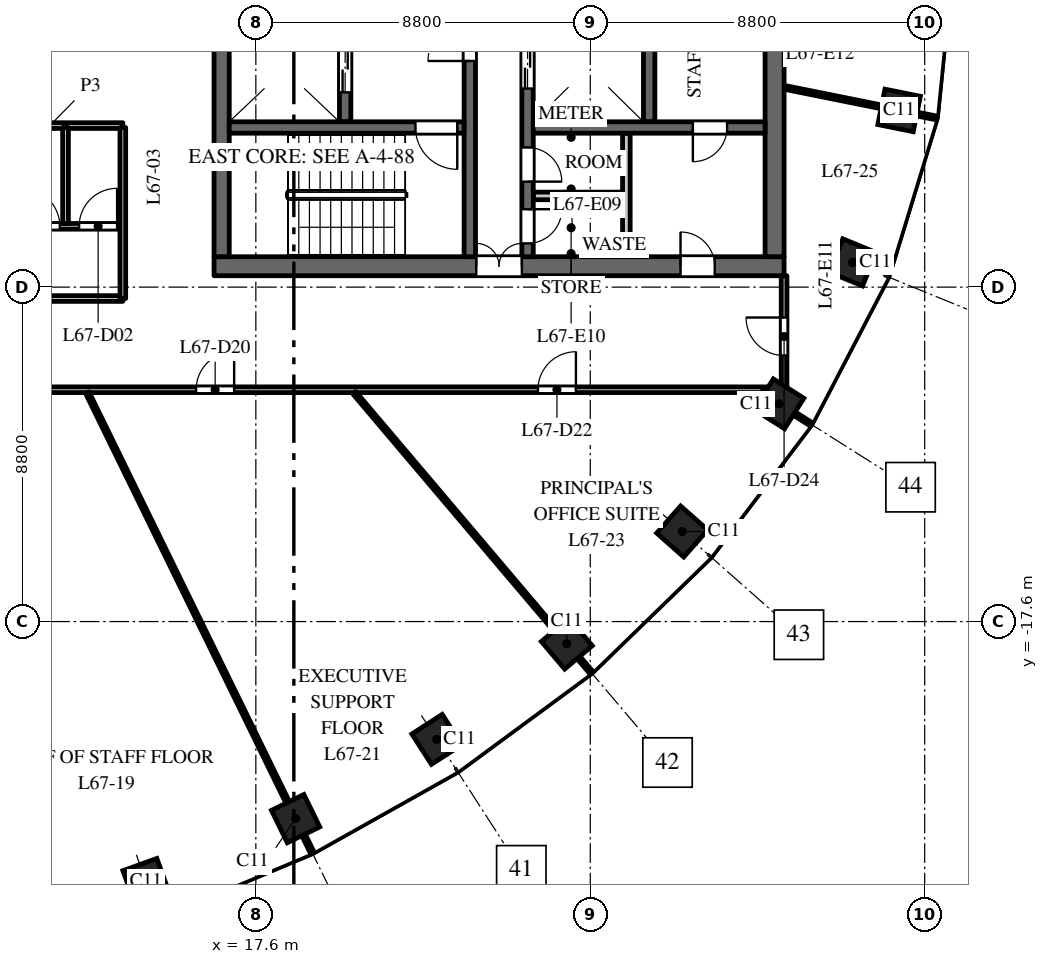
"""IFC4 building model, lengths in metres.
Left out: names, types, materials, properties, quantities, classifications, styles, units other than length and angle.
Written with IfcOpenShell. Run it as: python <this file> out.ifc"""

import sys

from ifc_helpers import new_model, si_unit, direction, frame, frame_2d, origin, origin_2d, place, context, subcontext, project, spatial, rectangle, extrude, element, fill, save


model = new_model("IFC4")
c1 = context("Model", 3, precision=1e-05, world=origin(), true_north=direction((0.0, 1.0)))
c2 = subcontext(c1, "Body", "Model", "MODEL_VIEW")
j1 = project(units=[si_unit("LENGTHUNIT", "METRE"), si_unit("PLANEANGLEUNIT", "RADIAN")], contexts=[c1])
p1 = place(None, origin())
s1 = spatial("IfcSite", under=j1, at=p1, CompositionType="ELEMENT")
p2 = place(p1, origin())
s2 = spatial("IfcBuilding", under=s1, at=p2, CompositionType="ELEMENT")
p3 = place(p2, frame((0.0, 0.0, 311.0)))
s3 = spatial("IfcBuildingStorey", under=s2, at=p3, CompositionType="ELEMENT", Elevation=311.0)
for number, where, z_axis, x_axis in (
    (1, (14.709, -24.441, 0.0), (0.0, 0.0, 1.0), (0.941, 0.338, 0.0)),
    (2, (18.646, -22.785, 0.0), (0.0, 0.0, 1.0), (0.898, 0.439, 0.0)),
    (3, (22.362, -20.7, 0.0), (0.0, 0.0, 1.0), (0.84, 0.542, 0.0)),
    (4, (25.783, -18.18, 0.0), (0.0, 0.0, 1.0), (0.763, 0.646, 0.0)),
    (5, (28.819, -15.23, 0.0), (0.0, 0.0, 1.0), (0.663, 0.749, 0.0)),
    (6, (31.365, -11.871, 0.0), (0.0, 0.0, 1.0), (0.535, 0.845, 0.0)),
    (7, (33.305, -8.149, 0.0), (0.0, 0.0, 1.0), (0.379, 0.925, 0.0)),
    (8, (34.527, -4.151, 0.0), (0.0, 0.0, 1.0), (0.197, 0.98, 0.0)),
):
    element("IfcColumn", number, at=place(p3, frame(where, z_axis=z_axis, x_axis=x_axis)), inside=s3, PredefinedType="COLUMN", context=c2, shape_type="SweptSolid", body=[
        extrude(rectangle(XDim=0.95, YDim=0.95, at=origin_2d()), origin(), (0.0, 0.0, 1.0), 4.0),
    ])
p4 = place(p3, frame((16.5, -8.25, 0.0), z_axis=(0.0, 0.0, 1.0), x_axis=(1.0, 0.0, 0.0)))
e9 = element("IfcWall", 9, at=p4, inside=s3, PredefinedType="SHEAR", context=c2, shape_type="SweptSolid", body=[
    extrude(rectangle(XDim=15.0, YDim=0.5, at=frame_2d((7.5, 0.0))), origin(), (0.0, 0.0, 1.0), 3.7),
])
p5 = place(p4, frame((6.9, 0.0, 0.0)))
e10 = element("IfcOpeningElement", 10, at=p5, cuts=e9, PredefinedType="OPENING", context=c2, shape_type="SweptSolid", body=[
    extrude(rectangle(XDim=1.2, YDim=2.1, at=frame_2d((0.6, 1.05))), frame((0.0, 0.26, 0.0), z_axis=(0.0, -1.0, 0.0), x_axis=(1.0, 0.0, 0.0)), (0.0, 0.0, 1.0), 0.52),
])
p6 = place(p4, frame((12.275, 0.0, 0.0)))
e11 = element("IfcOpeningElement", 11, at=p6, cuts=e9, PredefinedType="OPENING", context=c2, shape_type="SweptSolid", body=[
    extrude(rectangle(XDim=0.9, YDim=2.1, at=frame_2d((0.45, 1.05))), frame((0.0, 0.26, 0.0), z_axis=(0.0, -1.0, 0.0), x_axis=(1.0, 0.0, 0.0)), (0.0, 0.0, 1.0), 0.52),
])
p7 = place(p3, frame((27.95, -4.45, 0.0), z_axis=(0.0, 0.0, 1.0), x_axis=(0.0, 1.0, 0.0)))
e12 = element("IfcWall", 12, at=p7, inside=s3, PredefinedType="SHEAR", context=c2, shape_type="SweptSolid", body=[
    extrude(rectangle(XDim=5.8, YDim=0.3, at=frame_2d((2.9, 0.0))), origin(), (0.0, 0.0, 1.0), 3.7),
])
p8 = place(p3, frame((19.95, -4.45, 0.0), z_axis=(0.0, 0.0, 1.0), x_axis=(0.0, 1.0, 0.0)))
e13 = element("IfcWall", 13, at=p8, inside=s3, PredefinedType="SHEAR", context=c2, shape_type="SweptSolid", body=[
    extrude(rectangle(XDim=8.9, YDim=0.3, at=frame_2d((4.45, 0.0))), origin(), (0.0, 0.0, 1.0), 3.7),
])
p9 = place(p8, frame((0.775, 0.0, 0.0)))
e14 = element("IfcOpeningElement", 14, at=p9, cuts=e13, PredefinedType="OPENING", context=c2, shape_type="SweptSolid", body=[
    extrude(rectangle(XDim=1.2, YDim=2.1, at=frame_2d((0.6, 1.05))), frame((0.0, 0.16, 0.0), z_axis=(0.0, -1.0, 0.0), x_axis=(1.0, 0.0, 0.0)), (0.0, 0.0, 1.0), 0.32),
])
p10 = place(p8, frame((6.0, 0.0, 0.0)))
e15 = element("IfcOpeningElement", 15, at=p10, cuts=e13, PredefinedType="OPENING", context=c2, shape_type="SweptSolid", body=[
    extrude(rectangle(XDim=0.9, YDim=2.1, at=frame_2d((0.45, 1.05))), frame((0.0, 0.16, 0.0), z_axis=(0.0, -1.0, 0.0), x_axis=(1.0, 0.0, 0.0)), (0.0, 0.0, 1.0), 0.32),
])
p11 = place(p3, frame((24.75, -8.0, 0.0), z_axis=(0.0, 0.0, 1.0), x_axis=(0.0, 1.0, 0.0)))
e16 = element("IfcWall", 16, at=p11, inside=s3, PredefinedType="SHEAR", context=c2, shape_type="SweptSolid", body=[
    extrude(rectangle(XDim=16.0, YDim=0.3, at=frame_2d((8.0, 0.0))), origin(), (0.0, 0.0, 1.0), 3.7),
])
p12 = place(p11, frame((4.425, 0.0, 0.0)))
e17 = element("IfcOpeningElement", 17, at=p12, cuts=e16, PredefinedType="OPENING", context=c2, shape_type="SweptSolid", body=[
    extrude(rectangle(XDim=1.1, YDim=2.1, at=frame_2d((0.55, 1.05))), frame((0.0, 0.16, 0.0), z_axis=(0.0, -1.0, 0.0), x_axis=(1.0, 0.0, 0.0)), (0.0, 0.0, 1.0), 0.32),
])
p13 = place(p11, frame((7.45, 0.0, 0.0)))
e18 = element("IfcOpeningElement", 18, at=p13, cuts=e16, PredefinedType="OPENING", context=c2, shape_type="SweptSolid", body=[
    extrude(rectangle(XDim=1.1, YDim=2.1, at=frame_2d((0.55, 1.05))), frame((0.0, 0.16, 0.0), z_axis=(0.0, -1.0, 0.0), x_axis=(1.0, 0.0, 0.0)), (0.0, 0.0, 1.0), 0.32),
])
p14 = place(p11, frame((10.575, 0.0, 0.0)))
e19 = element("IfcOpeningElement", 19, at=p14, cuts=e16, PredefinedType="OPENING", context=c2, shape_type="SweptSolid", body=[
    extrude(rectangle(XDim=0.9, YDim=2.1, at=frame_2d((0.45, 1.05))), frame((0.0, 0.16, 0.0), z_axis=(0.0, -1.0, 0.0), x_axis=(1.0, 0.0, 0.0)), (0.0, 0.0, 1.0), 0.32),
])
p15 = place(p11, frame((13.75, 0.0, 0.0)))
e20 = element("IfcOpeningElement", 20, at=p15, cuts=e16, PredefinedType="OPENING", context=c2, shape_type="SweptSolid", body=[
    extrude(rectangle(XDim=0.9, YDim=2.1, at=frame_2d((0.45, 1.05))), frame((0.0, 0.16, 0.0), z_axis=(0.0, -1.0, 0.0), x_axis=(1.0, 0.0, 0.0)), (0.0, 0.0, 1.0), 0.32),
])
p16 = place(p11, frame((1.975, 0.0, 0.0)))
e21 = element("IfcOpeningElement", 21, at=p16, cuts=e16, PredefinedType="OPENING", context=c2, shape_type="SweptSolid", body=[
    extrude(rectangle(XDim=0.9, YDim=2.1, at=frame_2d((0.45, 1.05))), frame((0.0, 0.16, 0.0), z_axis=(0.0, -1.0, 0.0), x_axis=(1.0, 0.0, 0.0)), (0.0, 0.0, 1.0), 0.32),
])
p17 = place(p11, frame((0.35, 0.0, 0.0)))
e22 = element("IfcOpeningElement", 22, at=p17, cuts=e16, PredefinedType="OPENING", context=c2, shape_type="SweptSolid", body=[
    extrude(rectangle(XDim=0.9, YDim=2.1, at=frame_2d((0.45, 1.05))), frame((0.0, 0.16, 0.0), z_axis=(0.0, -1.0, 0.0), x_axis=(1.0, 0.0, 0.0)), (0.0, 0.0, 1.0), 0.32),
])
p18 = place(p3, frame((16.7, -8.0, 0.0), z_axis=(0.0, 0.0, 1.0), x_axis=(0.0, 1.0, 0.0)))
e23 = element("IfcWall", 23, at=p18, inside=s3, PredefinedType="SHEAR", context=c2, shape_type="SweptSolid", body=[
    extrude(rectangle(XDim=16.0, YDim=0.4, at=frame_2d((8.0, 0.0))), origin(), (0.0, 0.0, 1.0), 3.7),
])
p19 = place(p3, frame((31.25, -8.0, 0.0), z_axis=(0.0, 0.0, 1.0), x_axis=(0.0, 1.0, 0.0)))
e24 = element("IfcWall", 24, at=p19, inside=s3, PredefinedType="SHEAR", context=c2, shape_type="SweptSolid", body=[
    extrude(rectangle(XDim=16.0, YDim=0.5, at=frame_2d((8.0, 0.0))), origin(), (0.0, 0.0, 1.0), 3.7),
])
p20 = place(p3, frame((27.35, -8.0, 0.0), z_axis=(0.0, 0.0, 1.0), x_axis=(0.0, 1.0, 0.0)))
e25 = element("IfcWall", 25, at=p20, inside=s3, PredefinedType="PARTITIONING", context=c2, shape_type="SweptSolid", body=[
    extrude(rectangle(XDim=3.25, YDim=0.2, at=frame_2d((1.625, 0.0))), origin(), (0.0, 0.0, 1.0), 3.7),
])
p21 = place(p3, frame((24.9, -6.4, 0.0), z_axis=(0.0, 0.0, 1.0), x_axis=(1.0, 0.0, 0.0)))
e26 = element("IfcWall", 26, at=p21, inside=s3, PredefinedType="PARTITIONING", context=c2, shape_type="SweptSolid", body=[
    extrude(rectangle(XDim=2.35, YDim=0.2, at=frame_2d((1.175, 0.0))), origin(), (0.0, 0.0, 1.0), 3.7),
])
p22 = place(p3, frame((24.9, -4.6, 0.0), z_axis=(0.0, 0.0, 1.0), x_axis=(1.0, 0.0, 0.0)))
e27 = element("IfcWall", 27, at=p22, inside=s3, PredefinedType="SHEAR", context=c2, shape_type="SweptSolid", body=[
    extrude(rectangle(XDim=6.1, YDim=0.3, at=frame_2d((3.05, 0.0))), origin(), (0.0, 0.0, 1.0), 3.7),
])
p23 = place(p22, frame((4.2, 0.0, 0.0)))
e28 = element("IfcOpeningElement", 28, at=p23, cuts=e27, PredefinedType="OPENING", context=c2, shape_type="SweptSolid", body=[
    extrude(rectangle(XDim=0.9, YDim=2.1, at=frame_2d((0.45, 1.05))), frame((0.0, 0.16, 0.0), z_axis=(0.0, -1.0, 0.0), x_axis=(1.0, 0.0, 0.0)), (0.0, 0.0, 1.0), 0.32),
])
p24 = place(p3, frame((23.23, -8.0, 0.0), z_axis=(0.0, 0.0, 1.0), x_axis=(0.0, 1.0, 0.0)))
e29 = element("IfcWall", 29, at=p24, inside=s3, PredefinedType="SHEAR", context=c2, shape_type="SweptSolid", body=[
    extrude(rectangle(XDim=7.875, YDim=0.3, at=frame_2d((3.938, 0.0))), origin(), (0.0, 0.0, 1.0), 3.7),
])
p25 = place(p24, frame((5.15, 0.0, 0.0)))
e30 = element("IfcOpeningElement", 30, at=p25, cuts=e29, PredefinedType="OPENING", context=c2, shape_type="SweptSolid", body=[
    extrude(rectangle(XDim=1.1, YDim=2.1, at=frame_2d((0.55, 1.05))), frame((0.0, 0.16, 0.0), z_axis=(0.0, -1.0, 0.0), x_axis=(1.0, 0.0, 0.0)), (0.0, 0.0, 1.0), 0.32),
])
p26 = place(p3, frame((16.9, -4.6, 0.0), z_axis=(0.0, 0.0, 1.0), x_axis=(1.0, 0.0, 0.0)))
e31 = element("IfcWall", 31, at=p26, inside=s3, PredefinedType="SHEAR", context=c2, shape_type="SweptSolid", body=[
    extrude(rectangle(XDim=6.18, YDim=0.3, at=frame_2d((3.09, 0.0))), origin(), (0.0, 0.0, 1.0), 3.7),
])
p27 = place(p26, frame((4.9, 0.0, 0.0)))
e32 = element("IfcOpeningElement", 32, at=p27, cuts=e31, PredefinedType="OPENING", context=c2, shape_type="SweptSolid", body=[
    extrude(rectangle(XDim=1.1, YDim=2.1, at=frame_2d((0.55, 1.05))), frame((0.0, 0.16, 0.0), z_axis=(0.0, -1.0, 0.0), x_axis=(1.0, 0.0, 0.0)), (0.0, 0.0, 1.0), 0.32),
])
p28 = place(p3, frame((1.8, -9.1, 0.0), z_axis=(0.0, 0.0, 1.0), x_axis=(1.0, 0.0, 0.0)))
e33 = element("IfcWall", 33, at=p28, inside=s3, PredefinedType="PARTITIONING", context=c2, shape_type="SweptSolid", body=[
    extrude(rectangle(XDim=12.3, YDim=0.15, at=frame_2d((6.15, 0.0))), origin(), (0.0, 0.0, 1.0), 2.85),
])
p29 = place(p28, frame((5.65, 0.0, 0.0)))
e34 = element("IfcOpeningElement", 34, at=p29, cuts=e33, PredefinedType="OPENING", context=c2, shape_type="SweptSolid", body=[
    extrude(rectangle(XDim=1.0, YDim=2.1, at=frame_2d((0.5, 1.05))), frame((0.0, 0.085, 0.0), z_axis=(0.0, -1.0, 0.0), x_axis=(1.0, 0.0, 0.0)), (0.0, 0.0, 1.0), 0.17),
])
p30 = place(p3, frame((7.129, -11.5, 0.0), z_axis=(0.0, 0.0, 1.0), x_axis=(1.0, 0.0, 0.0)))
e35 = element("IfcWall", 35, at=p30, inside=s3, PredefinedType="PARTITIONING", context=c2, shape_type="SweptSolid", body=[
    extrude(rectangle(XDim=24.371, YDim=0.15, at=frame_2d((12.186, 0.0))), origin(), (0.0, 0.0, 1.0), 2.75),
])
p31 = place(p30, frame((2.383, 0.0, 0.0)))
e36 = element("IfcOpeningElement", 36, at=p31, cuts=e35, PredefinedType="OPENING", context=c2, shape_type="SweptSolid", body=[
    extrude(rectangle(XDim=1.0, YDim=2.1, at=frame_2d((0.5, 1.05))), frame((0.0, 0.085, 0.0), z_axis=(0.0, -1.0, 0.0), x_axis=(1.0, 0.0, 0.0)), (0.0, 0.0, 1.0), 0.17),
])
p32 = place(p30, frame((8.9, 0.0, 0.0)))
e37 = element("IfcOpeningElement", 37, at=p32, cuts=e35, PredefinedType="OPENING", context=c2, shape_type="SweptSolid", body=[
    extrude(rectangle(XDim=1.0, YDim=2.1, at=frame_2d((0.5, 1.05))), frame((0.0, 0.085, 0.0), z_axis=(0.0, -1.0, 0.0), x_axis=(1.0, 0.0, 0.0)), (0.0, 0.0, 1.0), 0.17),
])
p33 = place(p30, frame((17.894, 0.0, 0.0)))
e38 = element("IfcOpeningElement", 38, at=p33, cuts=e35, PredefinedType="OPENING", context=c2, shape_type="SweptSolid", body=[
    extrude(rectangle(XDim=1.0, YDim=2.1, at=frame_2d((0.5, 1.05))), frame((0.0, 0.085, 0.0), z_axis=(0.0, -1.0, 0.0), x_axis=(1.0, 0.0, 0.0)), (0.0, 0.0, 1.0), 0.17),
])
p34 = place(p3, frame((8.271, -4.55, 0.0), z_axis=(0.0, 0.0, 1.0), x_axis=(1.0, 0.0, 0.0)))
e39 = element("IfcWall", 39, at=p34, inside=s3, PredefinedType="PARTITIONING", context=c2, shape_type="SweptSolid", body=[
    extrude(rectangle(XDim=5.829, YDim=0.15, at=frame_2d((2.915, 0.0))), origin(), (0.0, 0.0, 1.0), 2.75),
])
p35 = place(p3, frame((9.576, -7.2, 0.0), z_axis=(0.0, 0.0, 1.0), x_axis=(1.0, 0.0, 0.0)))
e40 = element("IfcWall", 40, at=p35, inside=s3, PredefinedType="PARTITIONING", context=c2, shape_type="SweptSolid", body=[
    extrude(rectangle(XDim=4.449, YDim=0.15, at=frame_2d((2.225, 0.0))), origin(), (0.0, 0.0, 1.0), 2.75),
])
p36 = place(p35, frame((3.374, 0.0, 0.0)))
e41 = element("IfcOpeningElement", 41, at=p36, cuts=e40, PredefinedType="OPENING", context=c2, shape_type="SweptSolid", body=[
    extrude(rectangle(XDim=1.0, YDim=2.1, at=frame_2d((0.5, 1.05))), frame((0.0, 0.085, 0.0), z_axis=(0.0, -1.0, 0.0), x_axis=(1.0, 0.0, 0.0)), (0.0, 0.0, 1.0), 0.17),
])
p37 = place(p35, frame((1.866, 0.0, 0.0)))
e42 = element("IfcOpeningElement", 42, at=p37, cuts=e40, PredefinedType="OPENING", context=c2, shape_type="SweptSolid", body=[
    extrude(rectangle(XDim=1.0, YDim=2.1, at=frame_2d((0.5, 1.05))), frame((0.0, 0.085, 0.0), z_axis=(0.0, -1.0, 0.0), x_axis=(1.0, 0.0, 0.0)), (0.0, 0.0, 1.0), 0.17),
])
p38 = place(p35, frame((0.358, 0.0, 0.0)))
e43 = element("IfcOpeningElement", 43, at=p38, cuts=e40, PredefinedType="OPENING", context=c2, shape_type="SweptSolid", body=[
    extrude(rectangle(XDim=1.0, YDim=2.1, at=frame_2d((0.5, 1.05))), frame((0.0, 0.085, 0.0), z_axis=(0.0, -1.0, 0.0), x_axis=(1.0, 0.0, 0.0)), (0.0, 0.0, 1.0), 0.17),
])
p39 = place(p3, frame((12.592, -7.125, 0.0), z_axis=(0.0, 0.0, 1.0), x_axis=(0.0, 1.0, 0.0)))
e44 = element("IfcWall", 44, at=p39, inside=s3, PredefinedType="PARTITIONING", context=c2, shape_type="SweptSolid", body=[
    extrude(rectangle(XDim=2.525, YDim=0.15, at=frame_2d((1.262, 0.0))), origin(), (0.0, 0.0, 1.0), 2.75),
])
p40 = place(p3, frame((13.167, -11.579, 0.0), z_axis=(0.0, 0.0, 1.0), x_axis=(0.439238726833, -0.898370380661, 0.0)))
e45 = element("IfcWall", 45, at=p40, inside=s3, PredefinedType="PARTITIONING", context=c2, shape_type="SweptSolid", body=[
    extrude(rectangle(XDim=13.475, YDim=0.1, at=frame_2d((6.738, 0.0))), origin(), (0.0, 0.0, 1.0), 3.0),
])
p41 = place(p3, frame((14.1, -9.1, 0.0), z_axis=(0.0, 0.0, 1.0), x_axis=(0.0, 1.0, 0.0)))
e46 = element("IfcWall", 46, at=p41, inside=s3, PredefinedType="PARTITIONING", context=c2, shape_type="SweptSolid", body=[
    extrude(rectangle(XDim=4.5, YDim=0.15, at=frame_2d((2.25, 0.0))), origin(), (0.0, 0.0, 1.0), 2.75),
])
p42 = place(p3, frame((20.189, -11.578, 0.0), z_axis=(0.0, 0.0, 1.0), x_axis=(0.646376264927, -0.763018822926, 0.0)))
e47 = element("IfcWall", 47, at=p42, inside=s3, PredefinedType="PARTITIONING", context=c2, shape_type="SweptSolid", body=[
    extrude(rectangle(XDim=9.655, YDim=0.1, at=frame_2d((4.828, 0.0))), origin(), (0.0, 0.0, 1.0), 3.0),
])
p43 = place(p3, frame((30.897, -11.575, 0.0), z_axis=(0.0, 0.0, 1.0), x_axis=(0.844757626245, -0.535149094086, 0.0)))
e48 = element("IfcWall", 48, at=p43, inside=s3, PredefinedType="PARTITIONING", context=c2, shape_type="SweptSolid", body=[
    extrude(rectangle(XDim=1.557, YDim=0.1, at=frame_2d((0.778, 0.0))), origin(), (0.0, 0.0, 1.0), 3.0),
])
p44 = place(p3, frame((31.5, -11.5, 0.0), z_axis=(0.0, 0.0, 1.0), x_axis=(0.0, 1.0, 0.0)))
e49 = element("IfcWall", 49, at=p44, inside=s3, PredefinedType="PARTITIONING", context=c2, shape_type="SweptSolid", body=[
    extrude(rectangle(XDim=3.0, YDim=0.15, at=frame_2d((1.5, 0.0))), origin(), (0.0, 0.0, 1.0), 3.0),
])
p45 = place(p44, frame((0.9, 0.0, 0.0)))
e50 = element("IfcOpeningElement", 50, at=p45, cuts=e49, PredefinedType="OPENING", context=c2, shape_type="SweptSolid", body=[
    extrude(rectangle(XDim=1.0, YDim=2.1, at=frame_2d((0.5, 1.05))), frame((0.0, 0.085, 0.0), z_axis=(0.0, -1.0, 0.0), x_axis=(1.0, 0.0, 0.0)), (0.0, 0.0, 1.0), 0.17),
])
p46 = place(p3, frame((31.5, -3.542, 0.0), z_axis=(0.0, 0.0, 1.0), x_axis=(0.980357474535, -0.197228857227, 0.0)))
e51 = element("IfcWall", 51, at=p46, inside=s3, PredefinedType="PARTITIONING", context=c2, shape_type="SweptSolid", body=[
    extrude(rectangle(XDim=4.092, YDim=0.1, at=frame_2d((2.046, 0.0))), origin(), (0.0, 0.0, 1.0), 3.0),
])
p47 = place(p9, origin())
e52 = element("IfcDoor", 52, at=p47, inside=s3, OperationType="DOUBLE_DOOR_SLIDING", PredefinedType="DOOR", context=c2, shape_type="SweptSolid", body=[
    extrude(rectangle(XDim=1.2, YDim=2.1, at=frame_2d((0.6, 1.05))), frame((0.0, 0.025, 0.0), z_axis=(0.0, -1.0, 0.0), x_axis=(1.0, 0.0, 0.0)), (0.0, 0.0, 1.0), 0.05),
])
fill(e14, e52)
p48 = place(p12, origin())
e53 = element("IfcDoor", 53, at=p48, inside=s3, OperationType="DOUBLE_DOOR_SLIDING", PredefinedType="DOOR", context=c2, shape_type="SweptSolid", body=[
    extrude(rectangle(XDim=1.1, YDim=2.1, at=frame_2d((0.55, 1.05))), frame((0.0, 0.025, 0.0), z_axis=(0.0, -1.0, 0.0), x_axis=(1.0, 0.0, 0.0)), (0.0, 0.0, 1.0), 0.05),
])
fill(e17, e53)
p49 = place(p27, origin())
e54 = element("IfcDoor", 54, at=p49, inside=s3, OperationType="SINGLE_SWING_RIGHT", PredefinedType="DOOR", context=c2, shape_type="SweptSolid", body=[
    extrude(rectangle(XDim=1.1, YDim=2.1, at=frame_2d((0.55, 1.05))), frame((0.0, 0.025, 0.0), z_axis=(0.0, -1.0, 0.0), x_axis=(1.0, 0.0, 0.0)), (0.0, 0.0, 1.0), 0.05),
])
fill(e32, e54)
p50 = place(p25, origin())
e55 = element("IfcDoor", 55, at=p50, inside=s3, OperationType="SINGLE_SWING_RIGHT", PredefinedType="DOOR", context=c2, shape_type="SweptSolid", body=[
    extrude(rectangle(XDim=1.1, YDim=2.1, at=frame_2d((0.55, 1.05))), frame((0.0, 0.025, 0.0), z_axis=(0.0, -1.0, 0.0), x_axis=(1.0, 0.0, 0.0)), (0.0, 0.0, 1.0), 0.05),
])
fill(e30, e55)
p51 = place(p5, origin())
e56 = element("IfcDoor", 56, at=p51, inside=s3, OperationType="DOUBLE_DOOR_DOUBLE_SWING", PredefinedType="DOOR", context=c2, shape_type="SweptSolid", body=[
    extrude(rectangle(XDim=1.2, YDim=2.1, at=frame_2d((0.6, 1.05))), frame((0.0, 0.025, 0.0), z_axis=(0.0, -1.0, 0.0), x_axis=(1.0, 0.0, 0.0)), (0.0, 0.0, 1.0), 0.05),
])
fill(e10, e56)
p52 = place(p16, origin())
e57 = element("IfcDoor", 57, at=p52, inside=s3, OperationType="SINGLE_SWING_LEFT", PredefinedType="DOOR", context=c2, shape_type="SweptSolid", body=[
    extrude(rectangle(XDim=0.9, YDim=2.1, at=frame_2d((0.45, 1.05))), frame((0.0, 0.025, 0.0), z_axis=(0.0, -1.0, 0.0), x_axis=(1.0, 0.0, 0.0)), (0.0, 0.0, 1.0), 0.05),
])
fill(e21, e57)
p53 = place(p17, origin())
e58 = element("IfcDoor", 58, at=p53, inside=s3, OperationType="SINGLE_SWING_RIGHT", PredefinedType="DOOR", context=c2, shape_type="SweptSolid", body=[
    extrude(rectangle(XDim=0.9, YDim=2.1, at=frame_2d((0.45, 1.05))), frame((0.0, 0.025, 0.0), z_axis=(0.0, -1.0, 0.0), x_axis=(1.0, 0.0, 0.0)), (0.0, 0.0, 1.0), 0.05),
])
fill(e22, e58)
p54 = place(p6, origin())
e59 = element("IfcDoor", 59, at=p54, inside=s3, OperationType="SINGLE_SWING_RIGHT", PredefinedType="DOOR", context=c2, shape_type="SweptSolid", body=[
    extrude(rectangle(XDim=0.9, YDim=2.1, at=frame_2d((0.45, 1.05))), frame((0.0, 0.025, 0.0), z_axis=(0.0, -1.0, 0.0), x_axis=(1.0, 0.0, 0.0)), (0.0, 0.0, 1.0), 0.05),
])
fill(e11, e59)
p55 = place(p23, origin())
e60 = element("IfcDoor", 60, at=p55, inside=s3, OperationType="SINGLE_SWING_LEFT", PredefinedType="DOOR", context=c2, shape_type="SweptSolid", body=[
    extrude(rectangle(XDim=0.9, YDim=2.1, at=frame_2d((0.45, 1.05))), frame((0.0, 0.025, 0.0), z_axis=(0.0, -1.0, 0.0), x_axis=(1.0, 0.0, 0.0)), (0.0, 0.0, 1.0), 0.05),
])
fill(e28, e60)
p56 = place(p36, origin())
e61 = element("IfcDoor", 61, at=p56, inside=s3, OperationType="SINGLE_SWING_RIGHT", PredefinedType="DOOR", context=c2, shape_type="SweptSolid", body=[
    extrude(rectangle(XDim=1.0, YDim=2.1, at=frame_2d((0.5, 1.05))), frame((0.0, 0.025, 0.0), z_axis=(0.0, -1.0, 0.0), x_axis=(1.0, 0.0, 0.0)), (0.0, 0.0, 1.0), 0.05),
])
fill(e41, e61)
p57 = place(p37, origin())
e62 = element("IfcDoor", 62, at=p57, inside=s3, OperationType="SINGLE_SWING_LEFT", PredefinedType="DOOR", context=c2, shape_type="SweptSolid", body=[
    extrude(rectangle(XDim=1.0, YDim=2.1, at=frame_2d((0.5, 1.05))), frame((0.0, 0.025, 0.0), z_axis=(0.0, -1.0, 0.0), x_axis=(1.0, 0.0, 0.0)), (0.0, 0.0, 1.0), 0.05),
])
fill(e42, e62)
p58 = place(p32, origin())
e63 = element("IfcDoor", 63, at=p58, inside=s3, OperationType="SINGLE_SWING_RIGHT", PredefinedType="DOOR", context=c2, shape_type="SweptSolid", body=[
    extrude(rectangle(XDim=1.0, YDim=2.1, at=frame_2d((0.5, 1.05))), frame((0.0, 0.025, 0.0), z_axis=(0.0, -1.0, 0.0), x_axis=(1.0, 0.0, 0.0)), (0.0, 0.0, 1.0), 0.05),
])
fill(e37, e63)
p59 = place(p33, origin())
e64 = element("IfcDoor", 64, at=p59, inside=s3, OperationType="SINGLE_SWING_RIGHT", PredefinedType="DOOR", context=c2, shape_type="SweptSolid", body=[
    extrude(rectangle(XDim=1.0, YDim=2.1, at=frame_2d((0.5, 1.05))), frame((0.0, 0.025, 0.0), z_axis=(0.0, -1.0, 0.0), x_axis=(1.0, 0.0, 0.0)), (0.0, 0.0, 1.0), 0.05),
])
fill(e38, e64)
p60 = place(p45, origin())
e65 = element("IfcDoor", 65, at=p60, inside=s3, OperationType="SINGLE_SWING_RIGHT", PredefinedType="DOOR", context=c2, shape_type="SweptSolid", body=[
    extrude(rectangle(XDim=1.0, YDim=2.1, at=frame_2d((0.5, 1.05))), frame((0.0, 0.025, 0.0), z_axis=(0.0, -1.0, 0.0), x_axis=(1.0, 0.0, 0.0)), (0.0, 0.0, 1.0), 0.05),
])
fill(e50, e65)
save(model, sys.argv[1])
